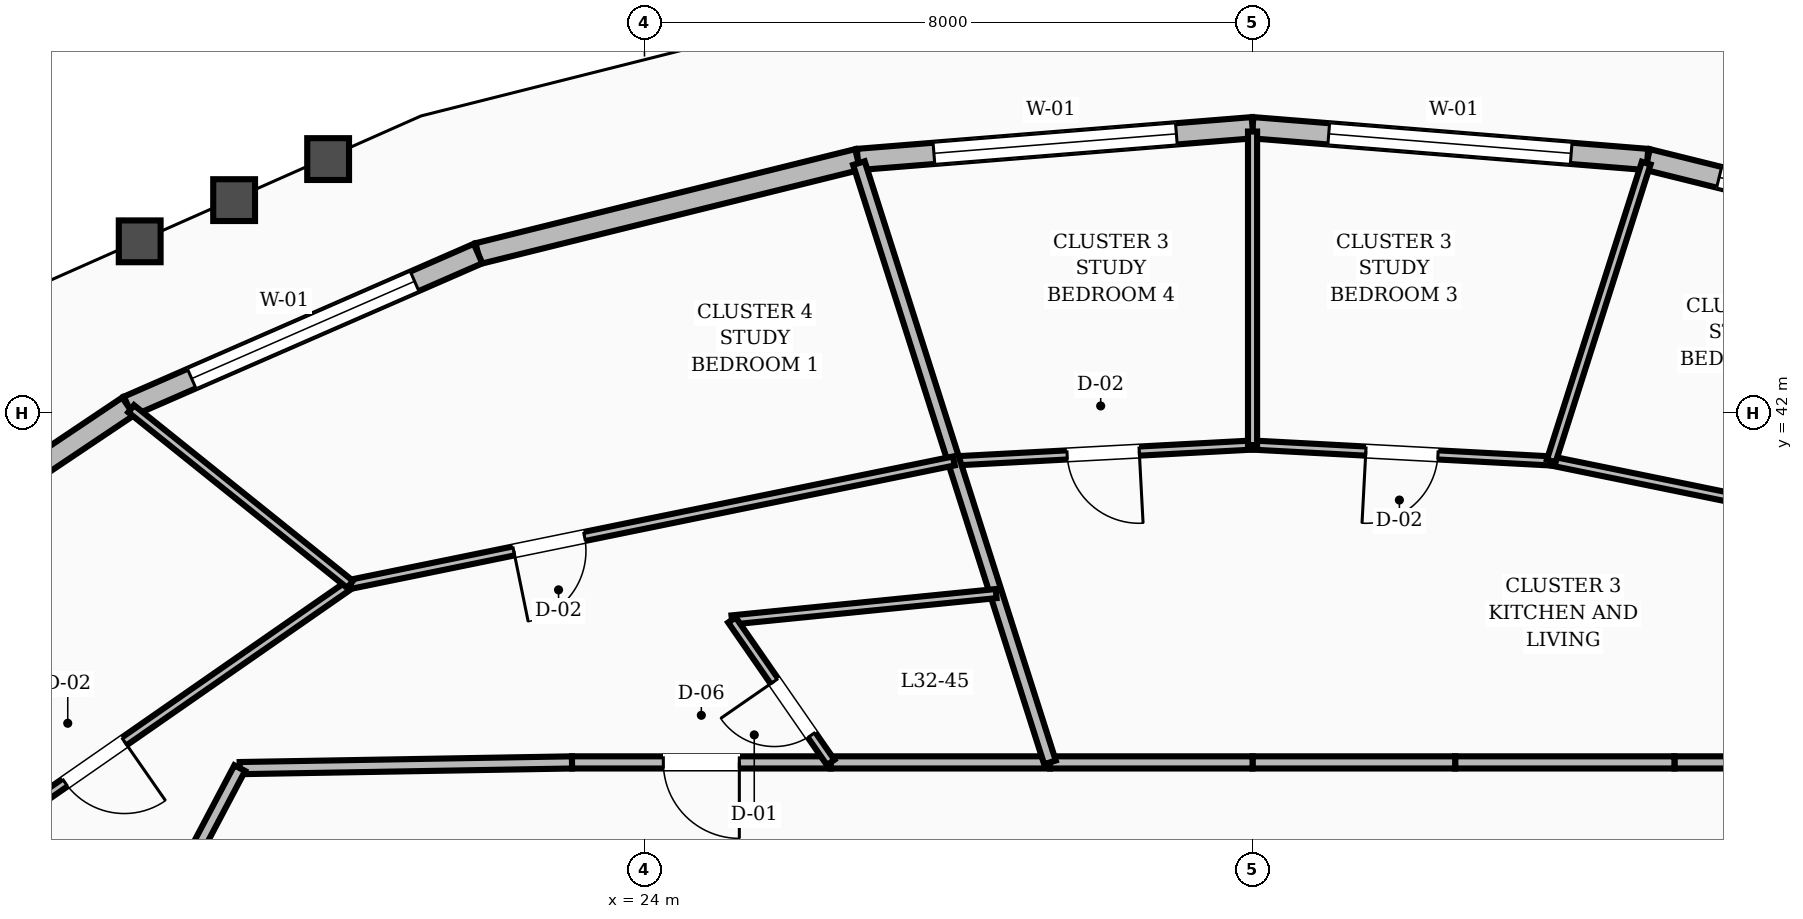
"""IFC4 building model, lengths in metres.
Left out: names, types, materials, properties, quantities, classifications, styles, units other than length and angle.
Written with IfcOpenShell. Run it as: python <this file> out.ifc"""

import sys

from ifc_helpers import new_model, si_unit, direction, frame, frame_2d, origin, place, context, subcontext, project, spatial, rectangle, extrude, element, fill, save


model = new_model("IFC4")
c1 = context("Model", 3, precision=1e-05, world=origin(), true_north=direction((0.0, 1.0)))
c2 = subcontext(c1, "Body", "Model", "MODEL_VIEW")
j1 = project(units=[si_unit("LENGTHUNIT", "METRE"), si_unit("PLANEANGLEUNIT", "RADIAN")], contexts=[c1])
p1 = place(None, origin())
s1 = spatial("IfcSite", under=j1, at=p1, CompositionType="ELEMENT")
p2 = place(p1, origin())
s2 = spatial("IfcBuilding", under=s1, at=p2, CompositionType="ELEMENT")
p3 = place(p2, frame((0.0, 0.0, 128.0)))
s3 = spatial("IfcBuildingStorey", under=s2, at=p3, CompositionType="ELEMENT", Elevation=128.0)
p4 = place(p3, frame((42.189, 44.094, 0.0), z_axis=(0.0, 0.0, 1.0), x_axis=(-0.970639991073, 0.240536915526, 0.0)))
e1 = element("IfcWall", 1, at=p4, inside=s3, PredefinedType="STANDARD", context=c2, shape_type="SweptSolid", body=[
    extrude(rectangle(XDim=5.146, YDim=0.28, at=frame_2d((2.573, 0.0))), origin(), (0.0, 0.0, 1.0), 2.82),
])
p5 = place(p4, frame((0.973, 0.0, 0.8)))
e2 = element("IfcOpeningElement", 2, at=p5, cuts=e1, PredefinedType="OPENING", context=c2, shape_type="SweptSolid", body=[
    extrude(rectangle(XDim=3.2, YDim=1.65, at=frame_2d((1.6, 0.825))), frame((0.0, 0.15, 0.0), z_axis=(0.0, -1.0, 0.0), x_axis=(1.0, 0.0, 0.0)), (0.0, 0.0, 1.0), 0.3),
])
p6 = place(p3, frame((37.194, 45.332, 0.0), z_axis=(0.0, 0.0, 1.0), x_axis=(-0.996778227936, 0.080207009129, 0.0)))
e3 = element("IfcWall", 3, at=p6, inside=s3, PredefinedType="STANDARD", context=c2, shape_type="SweptSolid", body=[
    extrude(rectangle(XDim=5.211, YDim=0.28, at=frame_2d((2.605, 0.0))), origin(), (0.0, 0.0, 1.0), 2.82),
])
p7 = place(p6, frame((1.006, 0.0, 0.8)))
e4 = element("IfcOpeningElement", 4, at=p7, cuts=e3, PredefinedType="OPENING", context=c2, shape_type="SweptSolid", body=[
    extrude(rectangle(XDim=3.2, YDim=1.65, at=frame_2d((1.6, 0.825))), frame((0.0, 0.15, 0.0), z_axis=(0.0, -1.0, 0.0), x_axis=(1.0, 0.0, 0.0)), (0.0, 0.0, 1.0), 0.3),
])
p8 = place(p3, frame((32.0, 45.75, 0.0), z_axis=(0.0, 0.0, 1.0), x_axis=(-0.996778227936, -0.080207009129, 0.0)))
e5 = element("IfcWall", 5, at=p8, inside=s3, PredefinedType="STANDARD", context=c2, shape_type="SweptSolid", body=[
    extrude(rectangle(XDim=5.211, YDim=0.28, at=frame_2d((2.605, 0.0))), origin(), (0.0, 0.0, 1.0), 2.82),
])
p9 = place(p8, frame((1.006, 0.0, 0.8)))
e6 = element("IfcOpeningElement", 6, at=p9, cuts=e5, PredefinedType="OPENING", context=c2, shape_type="SweptSolid", body=[
    extrude(rectangle(XDim=3.2, YDim=1.65, at=frame_2d((1.6, 0.825))), frame((0.0, 0.15, 0.0), z_axis=(0.0, -1.0, 0.0), x_axis=(1.0, 0.0, 0.0)), (0.0, 0.0, 1.0), 0.3),
])
p10 = place(p3, frame((26.806, 45.332, 0.0), z_axis=(0.0, 0.0, 1.0), x_axis=(-0.970639991073, -0.240536915526, 0.0)))
e7 = element("IfcWall", 7, at=p10, inside=s3, PredefinedType="STANDARD", context=c2, shape_type="SweptSolid", body=[
    extrude(rectangle(XDim=5.146, YDim=0.28, at=frame_2d((2.573, 0.0))), origin(), (0.0, 0.0, 1.0), 2.82),
])
p11 = place(p3, frame((21.811, 44.094, 0.0), z_axis=(0.0, 0.0, 1.0), x_axis=(-0.916453831221, -0.400140444394, 0.0)))
e8 = element("IfcWall", 8, at=p11, inside=s3, PredefinedType="STANDARD", context=c2, shape_type="SweptSolid", body=[
    extrude(rectangle(XDim=5.023, YDim=0.28, at=frame_2d((2.511, 0.0))), origin(), (0.0, 0.0, 1.0), 2.82),
])
p12 = place(p11, frame((0.911, 0.0, 0.8)))
e9 = element("IfcOpeningElement", 9, at=p12, cuts=e8, PredefinedType="OPENING", context=c2, shape_type="SweptSolid", body=[
    extrude(rectangle(XDim=3.2, YDim=1.65, at=frame_2d((1.6, 0.825))), frame((0.0, 0.15, 0.0), z_axis=(0.0, -1.0, 0.0), x_axis=(1.0, 0.0, 0.0)), (0.0, 0.0, 1.0), 0.3),
])
p13 = place(p3, frame((17.208, 42.084, 0.0), z_axis=(0.0, 0.0, 1.0), x_axis=(-0.830609353865, -0.556855547941, 0.0)))
e10 = element("IfcWall", 10, at=p13, inside=s3, PredefinedType="STANDARD", context=c2, shape_type="SweptSolid", body=[
    extrude(rectangle(XDim=4.858, YDim=0.28, at=frame_2d((2.429, 0.0))), origin(), (0.0, 0.0, 1.0), 2.82),
])
p14 = place(p3, frame((40.954, 37.4, 0.0), z_axis=(0.0, 0.0, 1.0), x_axis=(-1.0, 0.0, 0.0)))
e11 = element("IfcWall", 11, at=p14, inside=s3, PredefinedType="SOLIDWALL", context=c2, shape_type="SweptSolid", body=[
    extrude(rectangle(XDim=3.403, YDim=0.16, at=frame_2d((1.702, 0.0))), origin(), (0.0, 0.0, 1.0), 2.8),
])
p15 = place(p3, frame((37.551, 37.4, 0.0), z_axis=(0.0, 0.0, 1.0), x_axis=(-1.0, 0.0, 0.0)))
e12 = element("IfcWall", 12, at=p15, inside=s3, PredefinedType="SOLIDWALL", context=c2, shape_type="SweptSolid", body=[
    extrude(rectangle(XDim=2.885, YDim=0.16, at=frame_2d((1.443, 0.0))), origin(), (0.0, 0.0, 1.0), 2.8),
])
for number, where, z_axis, x_axis in (
    (13, (34.665, 37.4, 0.0), (0.0, 0.0, 1.0), (-1.0, 0.0, 0.0)),
    (14, (32.0, 37.4, 0.0), (0.0, 0.0, 1.0), (-1.0, 0.0, 0.0)),
):
    element("IfcWall", number, at=place(p3, frame(where, z_axis=z_axis, x_axis=x_axis)), inside=s3, PredefinedType="SOLIDWALL", context=c2, shape_type="SweptSolid", body=[
        extrude(rectangle(XDim=2.665, YDim=0.16, at=frame_2d((1.333, 0.0))), origin(), (0.0, 0.0, 1.0), 2.8),
    ])
p16 = place(p3, frame((29.335, 37.4, 0.0), z_axis=(0.0, 0.0, 1.0), x_axis=(-1.0, 0.0, 0.0)))
e15 = element("IfcWall", 15, at=p16, inside=s3, PredefinedType="SOLIDWALL", context=c2, shape_type="SweptSolid", body=[
    extrude(rectangle(XDim=2.885, YDim=0.16, at=frame_2d((1.443, 0.0))), origin(), (0.0, 0.0, 1.0), 2.8),
])
p17 = place(p3, frame((26.449, 37.4, 0.0), z_axis=(0.0, 0.0, 1.0), x_axis=(-1.0, 0.0, 0.0)))
e16 = element("IfcWall", 16, at=p17, inside=s3, PredefinedType="SOLIDWALL", context=c2, shape_type="SweptSolid", body=[
    extrude(rectangle(XDim=3.403, YDim=0.16, at=frame_2d((1.702, 0.0))), origin(), (0.0, 0.0, 1.0), 2.8),
])
p18 = place(p17, frame((1.201, 0.0, 0.0)))
e17 = element("IfcOpeningElement", 17, at=p18, cuts=e16, PredefinedType="OPENING", context=c2, shape_type="SweptSolid", body=[
    extrude(rectangle(XDim=1.0, YDim=2.1, at=frame_2d((0.5, 1.05))), frame((0.0, 0.09, 0.0), z_axis=(0.0, -1.0, 0.0), x_axis=(1.0, 0.0, 0.0)), (0.0, 0.0, 1.0), 0.18),
])
p19 = place(p3, frame((23.046, 37.4, 0.0), z_axis=(0.0, 0.0, 1.0), x_axis=(-0.999853038912, -0.017143528788, 0.0)))
e18 = element("IfcWall", 18, at=p19, inside=s3, PredefinedType="SOLIDWALL", context=c2, shape_type="SweptSolid", body=[
    extrude(rectangle(XDim=4.372, YDim=0.16, at=frame_2d((2.186, 0.0))), origin(), (0.0, 0.0, 1.0), 2.8),
])
p20 = place(p3, frame((18.675, 37.325, 0.0), z_axis=(0.0, 0.0, 1.0), x_axis=(-0.466737093093, -0.884396113702, 0.0)))
e19 = element("IfcWall", 19, at=p20, inside=s3, PredefinedType="SOLIDWALL", context=c2, shape_type="SweptSolid", body=[
    extrude(rectangle(XDim=3.696, YDim=0.16, at=frame_2d((1.848, 0.0))), origin(), (0.0, 0.0, 1.0), 2.8),
])
p21 = place(p3, frame((43.873, 39.742, 0.0), z_axis=(0.0, 0.0, 1.0), x_axis=(-0.979737902763, 0.20028390322, 0.0)))
e20 = element("IfcWall", 20, at=p21, inside=s3, PredefinedType="PARTITIONING", context=c2, shape_type="SweptSolid", body=[
    extrude(rectangle(XDim=8.107, YDim=0.12, at=frame_2d((4.054, 0.0))), origin(), (0.0, 0.0, 1.0), 2.8),
])
p22 = place(p21, frame((3.579, 0.0, 0.0)))
e21 = element("IfcOpeningElement", 21, at=p22, cuts=e20, PredefinedType="OPENING", context=c2, shape_type="SweptSolid", body=[
    extrude(rectangle(XDim=0.95, YDim=2.1, at=frame_2d((0.475, 1.05))), frame((0.0, 0.07, 0.0), z_axis=(0.0, -1.0, 0.0), x_axis=(1.0, 0.0, 0.0)), (0.0, 0.0, 1.0), 0.14),
])
p23 = place(p3, frame((35.93, 41.366, 0.0), z_axis=(0.0, 0.0, 1.0), x_axis=(-0.998589062602, 0.053102580455, 0.0)))
e22 = element("IfcWall", 22, at=p23, inside=s3, PredefinedType="PARTITIONING", context=c2, shape_type="SweptSolid", body=[
    extrude(rectangle(XDim=3.936, YDim=0.12, at=frame_2d((1.968, 0.0))), origin(), (0.0, 0.0, 1.0), 2.8),
])
p24 = place(p23, frame((1.493, 0.0, 0.0)))
e23 = element("IfcOpeningElement", 23, at=p24, cuts=e22, PredefinedType="OPENING", context=c2, shape_type="SweptSolid", body=[
    extrude(rectangle(XDim=0.95, YDim=2.1, at=frame_2d((0.475, 1.05))), frame((0.0, 0.07, 0.0), z_axis=(0.0, -1.0, 0.0), x_axis=(1.0, 0.0, 0.0)), (0.0, 0.0, 1.0), 0.14),
])
p25 = place(p3, frame((35.93, 41.366, 0.0), z_axis=(0.0, 0.0, 1.0), x_axis=(0.303752449649, 0.952750990203, 0.0)))
e24 = element("IfcWall", 24, at=p25, inside=s3, PredefinedType="PARTITIONING", context=c2, shape_type="SweptSolid", body=[
    extrude(rectangle(XDim=4.113, YDim=0.12, at=frame_2d((2.056, 0.0))), origin(), (0.0, 0.0, 1.0), 2.8),
])
p26 = place(p3, frame((32.0, 41.575, 0.0), z_axis=(0.0, 0.0, 1.0), x_axis=(-0.998589062602, -0.053102580455, 0.0)))
e25 = element("IfcWall", 25, at=p26, inside=s3, PredefinedType="PARTITIONING", context=c2, shape_type="SweptSolid", body=[
    extrude(rectangle(XDim=3.936, YDim=0.12, at=frame_2d((1.968, 0.0))), origin(), (0.0, 0.0, 1.0), 2.8),
])
p27 = place(p26, frame((1.493, 0.0, 0.0)))
e26 = element("IfcOpeningElement", 26, at=p27, cuts=e25, PredefinedType="OPENING", context=c2, shape_type="SweptSolid", body=[
    extrude(rectangle(XDim=0.95, YDim=2.1, at=frame_2d((0.475, 1.05))), frame((0.0, 0.07, 0.0), z_axis=(0.0, -1.0, 0.0), x_axis=(1.0, 0.0, 0.0)), (0.0, 0.0, 1.0), 0.14),
])
p28 = place(p3, frame((32.0, 41.575, 0.0), z_axis=(0.0, 0.0, 1.0), x_axis=(0.0, 1.0, 0.0)))
e27 = element("IfcWall", 27, at=p28, inside=s3, PredefinedType="PARTITIONING", context=c2, shape_type="SweptSolid", body=[
    extrude(rectangle(XDim=4.125, YDim=0.12, at=frame_2d((2.062, 0.0))), origin(), (0.0, 0.0, 1.0), 2.8),
])
p29 = place(p3, frame((29.335, 37.4, 0.0), z_axis=(0.0, 0.0, 1.0), x_axis=(-0.303774698935, 0.952743896484, 0.0)))
e28 = element("IfcWall", 28, at=p29, inside=s3, PredefinedType="SOLIDWALL", context=c2, shape_type="SweptSolid", body=[
    extrude(rectangle(XDim=8.276, YDim=0.16, at=frame_2d((4.138, 0.0))), origin(), (0.0, 0.0, 1.0), 2.8),
])
p30 = place(p3, frame((28.626, 39.621, 0.0), z_axis=(0.0, 0.0, 1.0), x_axis=(-0.995062761534, -0.099247673062, 0.0)))
e29 = element("IfcWall", 29, at=p30, inside=s3, PredefinedType="PARTITIONING", context=c2, shape_type="SweptSolid", body=[
    extrude(rectangle(XDim=3.493, YDim=0.12, at=frame_2d((1.747, 0.0))), origin(), (0.0, 0.0, 1.0), 2.8),
])
p31 = place(p3, frame((26.449, 37.4, 0.0), z_axis=(0.0, 0.0, 1.0), x_axis=(-0.56953281294, 0.821968597322, 0.0)))
e30 = element("IfcWall", 30, at=p31, inside=s3, PredefinedType="PARTITIONING", context=c2, shape_type="SweptSolid", body=[
    extrude(rectangle(XDim=2.281, YDim=0.12, at=frame_2d((1.14, 0.0))), origin(), (0.0, 0.0, 1.0), 2.8),
])
p32 = place(p31, frame((0.44, 0.0, 0.0)))
e31 = element("IfcOpeningElement", 31, at=p32, cuts=e30, PredefinedType="OPENING", context=c2, shape_type="SweptSolid", body=[
    extrude(rectangle(XDim=0.86, YDim=2.1, at=frame_2d((0.43, 1.05))), frame((0.0, 0.07, 0.0), z_axis=(0.0, -1.0, 0.0), x_axis=(1.0, 0.0, 0.0)), (0.0, 0.0, 1.0), 0.14),
])
p33 = place(p3, frame((28.07, 41.366, 0.0), z_axis=(0.0, 0.0, 1.0), x_axis=(-0.979737902763, -0.20028390322, 0.0)))
e32 = element("IfcWall", 32, at=p33, inside=s3, PredefinedType="PARTITIONING", context=c2, shape_type="SweptSolid", body=[
    extrude(rectangle(XDim=8.107, YDim=0.12, at=frame_2d((4.054, 0.0))), origin(), (0.0, 0.0, 1.0), 2.8),
])
p34 = place(p33, frame((4.96, 0.0, 0.0)))
e33 = element("IfcOpeningElement", 33, at=p34, cuts=e32, PredefinedType="OPENING", context=c2, shape_type="SweptSolid", body=[
    extrude(rectangle(XDim=0.95, YDim=2.1, at=frame_2d((0.475, 1.05))), frame((0.0, 0.07, 0.0), z_axis=(0.0, -1.0, 0.0), x_axis=(1.0, 0.0, 0.0)), (0.0, 0.0, 1.0), 0.14),
])
p35 = place(p3, frame((20.127, 39.742, 0.0), z_axis=(0.0, 0.0, 1.0), x_axis=(-0.821081459347, -0.570811034508, 0.0)))
e34 = element("IfcWall", 34, at=p35, inside=s3, PredefinedType="PARTITIONING", context=c2, shape_type="SweptSolid", body=[
    extrude(rectangle(XDim=8.186, YDim=0.12, at=frame_2d((4.093, 0.0))), origin(), (0.0, 0.0, 1.0), 2.8),
])
p36 = place(p35, frame((3.618, 0.0, 0.0)))
e35 = element("IfcOpeningElement", 35, at=p36, cuts=e34, PredefinedType="OPENING", context=c2, shape_type="SweptSolid", body=[
    extrude(rectangle(XDim=0.95, YDim=2.1, at=frame_2d((0.475, 1.05))), frame((0.0, 0.07, 0.0), z_axis=(0.0, -1.0, 0.0), x_axis=(1.0, 0.0, 0.0)), (0.0, 0.0, 1.0), 0.14),
])
p37 = place(p3, frame((20.127, 39.742, 0.0), z_axis=(0.0, 0.0, 1.0), x_axis=(-0.780010206727, 0.625766791547, 0.0)))
e36 = element("IfcWall", 36, at=p37, inside=s3, PredefinedType="PARTITIONING", context=c2, shape_type="SweptSolid", body=[
    extrude(rectangle(XDim=3.693, YDim=0.12, at=frame_2d((1.846, 0.0))), origin(), (0.0, 0.0, 1.0), 2.8),
])
p38 = place(p5, origin())
e37 = element("IfcWindow", 37, at=p38, inside=s3, PartitioningType="SINGLE_PANEL", PredefinedType="WINDOW", context=c2, shape_type="SweptSolid", body=[
    extrude(rectangle(XDim=3.2, YDim=1.65, at=frame_2d((1.6, 0.825))), frame((0.0, 0.03, 0.0), z_axis=(0.0, -1.0, 0.0), x_axis=(1.0, 0.0, 0.0)), (0.0, 0.0, 1.0), 0.06),
])
fill(e2, e37)
p39 = place(p7, origin())
e38 = element("IfcWindow", 38, at=p39, inside=s3, PartitioningType="SINGLE_PANEL", PredefinedType="WINDOW", context=c2, shape_type="SweptSolid", body=[
    extrude(rectangle(XDim=3.2, YDim=1.65, at=frame_2d((1.6, 0.825))), frame((0.0, 0.03, 0.0), z_axis=(0.0, -1.0, 0.0), x_axis=(1.0, 0.0, 0.0)), (0.0, 0.0, 1.0), 0.06),
])
fill(e4, e38)
p40 = place(p9, origin())
e39 = element("IfcWindow", 39, at=p40, inside=s3, PartitioningType="SINGLE_PANEL", PredefinedType="WINDOW", context=c2, shape_type="SweptSolid", body=[
    extrude(rectangle(XDim=3.2, YDim=1.65, at=frame_2d((1.6, 0.825))), frame((0.0, 0.03, 0.0), z_axis=(0.0, -1.0, 0.0), x_axis=(1.0, 0.0, 0.0)), (0.0, 0.0, 1.0), 0.06),
])
fill(e6, e39)
p41 = place(p12, origin())
e40 = element("IfcWindow", 40, at=p41, inside=s3, PartitioningType="SINGLE_PANEL", PredefinedType="WINDOW", context=c2, shape_type="SweptSolid", body=[
    extrude(rectangle(XDim=3.2, YDim=1.65, at=frame_2d((1.6, 0.825))), frame((0.0, 0.03, 0.0), z_axis=(0.0, -1.0, 0.0), x_axis=(1.0, 0.0, 0.0)), (0.0, 0.0, 1.0), 0.06),
])
fill(e9, e40)
p42 = place(p24, origin())
e41 = element("IfcDoor", 41, at=p42, inside=s3, OperationType="SINGLE_SWING_RIGHT", PredefinedType="DOOR", context=c2, shape_type="SweptSolid", body=[
    extrude(rectangle(XDim=0.95, YDim=2.1, at=frame_2d((0.475, 1.05))), frame((0.0, 0.025, 0.0), z_axis=(0.0, -1.0, 0.0), x_axis=(1.0, 0.0, 0.0)), (0.0, 0.0, 1.0), 0.05),
])
fill(e23, e41)
p43 = place(p27, origin())
e42 = element("IfcDoor", 42, at=p43, inside=s3, OperationType="SINGLE_SWING_LEFT", PredefinedType="DOOR", context=c2, shape_type="SweptSolid", body=[
    extrude(rectangle(XDim=0.95, YDim=2.1, at=frame_2d((0.475, 1.05))), frame((0.0, 0.025, 0.0), z_axis=(0.0, -1.0, 0.0), x_axis=(1.0, 0.0, 0.0)), (0.0, 0.0, 1.0), 0.05),
])
fill(e26, e42)
p44 = place(p32, origin())
e43 = element("IfcDoor", 43, at=p44, inside=s3, OperationType="SINGLE_SWING_RIGHT", PredefinedType="DOOR", context=c2, shape_type="SweptSolid", body=[
    extrude(rectangle(XDim=0.86, YDim=2.1, at=frame_2d((0.43, 1.05))), frame((0.0, 0.025, 0.0), z_axis=(0.0, -1.0, 0.0), x_axis=(1.0, 0.0, 0.0)), (0.0, 0.0, 1.0), 0.05),
])
fill(e31, e43)
p45 = place(p18, origin())
e44 = element("IfcDoor", 44, at=p45, inside=s3, OperationType="SINGLE_SWING_LEFT", PredefinedType="DOOR", context=c2, shape_type="SweptSolid", body=[
    extrude(rectangle(XDim=1.0, YDim=2.1, at=frame_2d((0.5, 1.05))), frame((0.0, 0.025, 0.0), z_axis=(0.0, -1.0, 0.0), x_axis=(1.0, 0.0, 0.0)), (0.0, 0.0, 1.0), 0.05),
])
fill(e17, e44)
p46 = place(p34, origin())
e45 = element("IfcDoor", 45, at=p46, inside=s3, OperationType="SINGLE_SWING_RIGHT", PredefinedType="DOOR", context=c2, shape_type="SweptSolid", body=[
    extrude(rectangle(XDim=0.95, YDim=2.1, at=frame_2d((0.475, 1.05))), frame((0.0, 0.025, 0.0), z_axis=(0.0, -1.0, 0.0), x_axis=(1.0, 0.0, 0.0)), (0.0, 0.0, 1.0), 0.05),
])
fill(e33, e45)
p47 = place(p36, origin())
e46 = element("IfcDoor", 46, at=p47, inside=s3, OperationType="SINGLE_SWING_LEFT", PredefinedType="DOOR", context=c2, shape_type="SweptSolid", body=[
    extrude(rectangle(XDim=0.95, YDim=2.1, at=frame_2d((0.475, 1.05))), frame((0.0, 0.025, 0.0), z_axis=(0.0, -1.0, 0.0), x_axis=(1.0, 0.0, 0.0)), (0.0, 0.0, 1.0), 0.05),
])
fill(e35, e46)
save(model, sys.argv[1])
